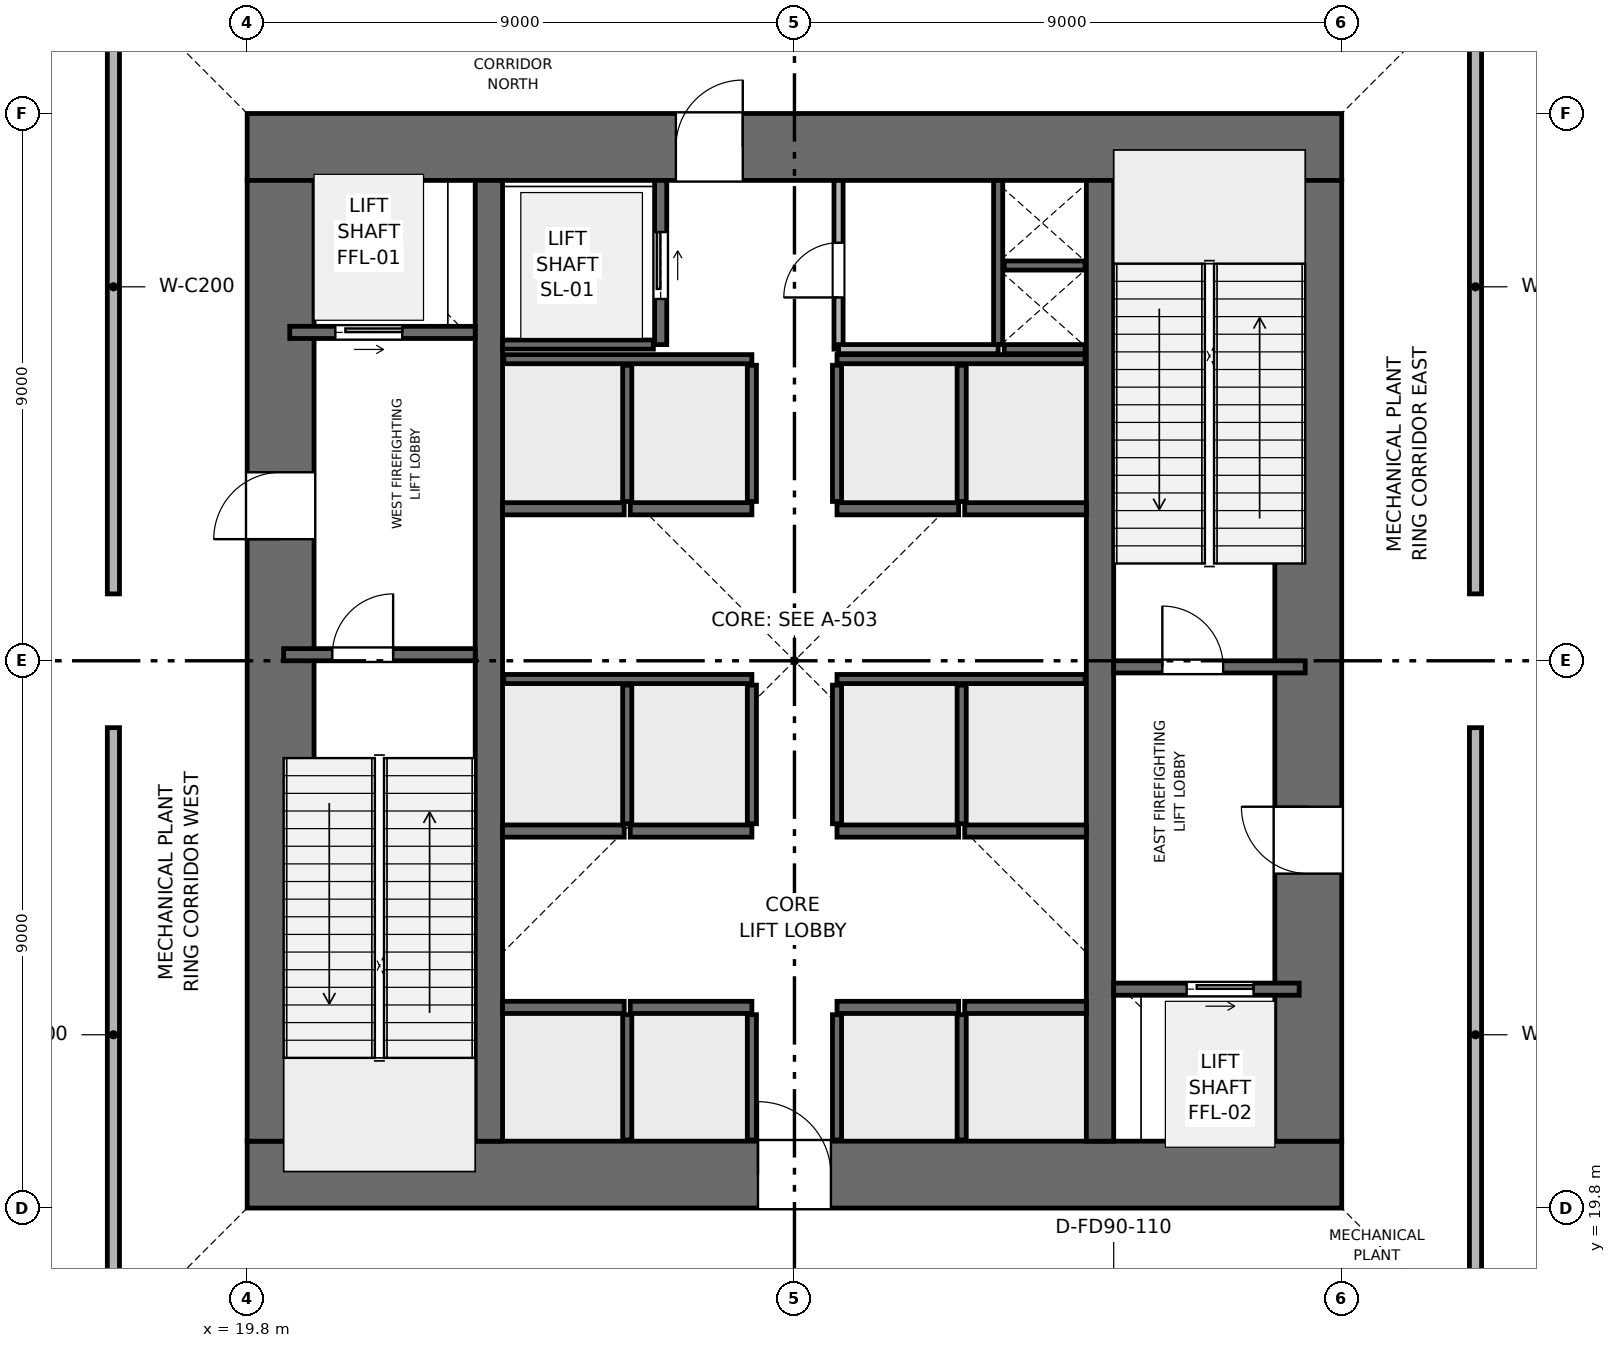
"""IFC4 building model, lengths in metres.
Left out: names, types, materials, properties, quantities, classifications, styles, units other than length and angle.
Written with IfcOpenShell. Run it as: python <this file> out.ifc"""

import sys

from ifc_helpers import new_model, si_unit, direction, frame, frame_2d, origin, place, context, subcontext, project, spatial, rectangle, extrude, element, fill, save


model = new_model("IFC4")
c1 = context("Model", 3, precision=1e-05, world=origin(), true_north=direction((0.0, 1.0)))
c2 = subcontext(c1, "Body", "Model", "MODEL_VIEW")
j1 = project(units=[si_unit("LENGTHUNIT", "METRE"), si_unit("PLANEANGLEUNIT", "RADIAN")], contexts=[c1])
p1 = place(None, origin())
s1 = spatial("IfcSite", under=j1, at=p1, CompositionType="ELEMENT")
p2 = place(p1, origin())
s2 = spatial("IfcBuilding", under=s1, at=p2, CompositionType="ELEMENT")
p3 = place(p2, frame((0.0, 0.0, 24.0)))
s3 = spatial("IfcBuildingStorey", under=s2, at=p3, CompositionType="ELEMENT", Elevation=24.0)
p4 = place(p3, frame((19.8, 20.35, 0.0), z_axis=(0.0, 0.0, 1.0), x_axis=(1.0, 0.0, 0.0)))
e1 = element("IfcWall", 1, at=p4, inside=s3, PredefinedType="SHEAR", context=c2, shape_type="SweptSolid", body=[
    extrude(rectangle(XDim=18.0, YDim=1.1, at=frame_2d((9.0, 0.0))), origin(), (0.0, 0.0, 1.0), 6.0),
])
p5 = place(p4, frame((8.4, 0.0, 0.0)))
e2 = element("IfcOpeningElement", 2, at=p5, cuts=e1, PredefinedType="OPENING", context=c2, shape_type="SweptSolid", body=[
    extrude(rectangle(XDim=1.2, YDim=2.2, at=frame_2d((0.6, 1.1))), frame((0.0, 0.56, 0.0), z_axis=(0.0, -1.0, 0.0), x_axis=(1.0, 0.0, 0.0)), (0.0, 0.0, 1.0), 1.12),
])
p6 = place(p3, frame((19.8, 37.25, 0.0), z_axis=(0.0, 0.0, 1.0), x_axis=(1.0, 0.0, 0.0)))
e3 = element("IfcWall", 3, at=p6, inside=s3, PredefinedType="SHEAR", context=c2, shape_type="SweptSolid", body=[
    extrude(rectangle(XDim=18.0, YDim=1.1, at=frame_2d((9.0, 0.0))), origin(), (0.0, 0.0, 1.0), 6.0),
])
p7 = place(p6, frame((7.05, 0.0, 0.0)))
e4 = element("IfcOpeningElement", 4, at=p7, cuts=e3, PredefinedType="OPENING", context=c2, shape_type="SweptSolid", body=[
    extrude(rectangle(XDim=1.1, YDim=2.15, at=frame_2d((0.55, 1.075))), frame((0.0, 0.56, 0.0), z_axis=(0.0, -1.0, 0.0), x_axis=(1.0, 0.0, 0.0)), (0.0, 0.0, 1.0), 1.12),
])
p8 = place(p3, frame((20.35, 20.9, 0.0), z_axis=(0.0, 0.0, 1.0), x_axis=(0.0, 1.0, 0.0)))
e5 = element("IfcWall", 5, at=p8, inside=s3, PredefinedType="SHEAR", context=c2, shape_type="SweptSolid", body=[
    extrude(rectangle(XDim=15.8, YDim=1.1, at=frame_2d((7.9, 0.0))), origin(), (0.0, 0.0, 1.0), 6.0),
])
p9 = place(p8, frame((9.9, 0.0, 0.0)))
e6 = element("IfcOpeningElement", 6, at=p9, cuts=e5, PredefinedType="OPENING", context=c2, shape_type="SweptSolid", body=[
    extrude(rectangle(XDim=1.1, YDim=2.15, at=frame_2d((0.55, 1.075))), frame((0.0, 0.56, 0.0), z_axis=(0.0, -1.0, 0.0), x_axis=(1.0, 0.0, 0.0)), (0.0, 0.0, 1.0), 1.12),
])
p10 = place(p3, frame((37.25, 20.9, 0.0), z_axis=(0.0, 0.0, 1.0), x_axis=(0.0, 1.0, 0.0)))
e7 = element("IfcWall", 7, at=p10, inside=s3, PredefinedType="SHEAR", context=c2, shape_type="SweptSolid", body=[
    extrude(rectangle(XDim=15.8, YDim=1.1, at=frame_2d((7.9, 0.0))), origin(), (0.0, 0.0, 1.0), 6.0),
])
p11 = place(p10, frame((4.4, 0.0, 0.0)))
e8 = element("IfcOpeningElement", 8, at=p11, cuts=e7, PredefinedType="OPENING", context=c2, shape_type="SweptSolid", body=[
    extrude(rectangle(XDim=1.1, YDim=2.15, at=frame_2d((0.55, 1.075))), frame((0.0, 0.56, 0.0), z_axis=(0.0, -1.0, 0.0), x_axis=(1.0, 0.0, 0.0)), (0.0, 0.0, 1.0), 1.12),
])
for number, where, z_axis, x_axis in (
    (9, (23.775, 20.9, 0.0), (0.0, 0.0, 1.0), (0.0, 1.0, 0.0)),
    (10, (33.825, 20.9, 0.0), (0.0, 0.0, 1.0), (0.0, 1.0, 0.0)),
):
    element("IfcWall", number, at=place(p3, frame(where, z_axis=z_axis, x_axis=x_axis)), inside=s3, PredefinedType="SHEAR", context=c2, shape_type="SweptSolid", body=[
        extrude(rectangle(XDim=15.8, YDim=0.45, at=frame_2d((7.9, 0.0))), origin(), (0.0, 0.0, 1.0), 6.0),
    ])
p12 = place(p3, frame((20.4, 28.9, 0.0), z_axis=(0.0, 0.0, 1.0), x_axis=(1.0, 0.0, 0.0)))
e11 = element("IfcWall", 11, at=p12, inside=s3, PredefinedType="SHEAR", context=c2, shape_type="SweptSolid", body=[
    extrude(rectangle(XDim=3.15, YDim=0.2, at=frame_2d((1.575, 0.0))), origin(), (0.0, 0.0, 1.0), 5.75),
])
p13 = place(p12, frame((0.8, 0.0, 0.0)))
e12 = element("IfcOpeningElement", 12, at=p13, cuts=e11, PredefinedType="OPENING", context=c2, shape_type="SweptSolid", body=[
    extrude(rectangle(XDim=1.0, YDim=2.1, at=frame_2d((0.5, 1.05))), frame((0.0, 0.11, 0.0), z_axis=(0.0, -1.0, 0.0), x_axis=(1.0, 0.0, 0.0)), (0.0, 0.0, 1.0), 0.22),
])
p14 = place(p3, frame((34.05, 28.7, 0.0), z_axis=(0.0, 0.0, 1.0), x_axis=(1.0, 0.0, 0.0)))
e13 = element("IfcWall", 13, at=p14, inside=s3, PredefinedType="SHEAR", context=c2, shape_type="SweptSolid", body=[
    extrude(rectangle(XDim=3.15, YDim=0.2, at=frame_2d((1.575, 0.0))), origin(), (0.0, 0.0, 1.0), 5.75),
])
p15 = place(p14, frame((0.8, 0.0, 0.0)))
e14 = element("IfcOpeningElement", 14, at=p15, cuts=e13, PredefinedType="OPENING", context=c2, shape_type="SweptSolid", body=[
    extrude(rectangle(XDim=1.0, YDim=2.1, at=frame_2d((0.5, 1.05))), frame((0.0, 0.11, 0.0), z_axis=(0.0, -1.0, 0.0), x_axis=(1.0, 0.0, 0.0)), (0.0, 0.0, 1.0), 0.22),
])
p16 = place(p3, frame((32.15, 34.0, 0.0), z_axis=(0.0, 0.0, 1.0), x_axis=(0.0, 1.0, 0.0)))
e15 = element("IfcWall", 15, at=p16, inside=s3, PredefinedType="SHEAR", context=c2, shape_type="SweptSolid", body=[
    extrude(rectangle(XDim=2.7, YDim=0.15, at=frame_2d((1.35, 0.0))), origin(), (0.0, 0.0, 1.0), 5.75),
])
for number, where, z_axis, x_axis in (
    (16, (32.25, 33.925, 0.0), (0.0, 0.0, 1.0), (1.0, 0.0, 0.0)),
    (17, (32.25, 35.3, 0.0), (0.0, 0.0, 1.0), (1.0, 0.0, 0.0)),
):
    element("IfcWall", number, at=place(p3, frame(where, z_axis=z_axis, x_axis=x_axis)), inside=s3, PredefinedType="SHEAR", context=c2, shape_type="SweptSolid", body=[
        extrude(rectangle(XDim=1.33, YDim=0.15, at=frame_2d((0.665, 0.0))), origin(), (0.0, 0.0, 1.0), 5.75),
    ])
p17 = place(p3, frame((20.5, 34.2, 0.0), z_axis=(0.0, 0.0, 1.0), x_axis=(1.0, 0.0, 0.0)))
e18 = element("IfcWall", 18, at=p17, inside=s3, PredefinedType="SHEAR", context=c2, shape_type="SweptSolid", body=[
    extrude(rectangle(XDim=3.05, YDim=0.2, at=frame_2d((1.525, 0.0))), origin(), (0.0, 0.0, 1.0), 5.75),
])
p18 = place(p17, frame((0.75, 0.0, 0.0)))
e19 = element("IfcOpeningElement", 19, at=p18, cuts=e18, PredefinedType="OPENING", context=c2, shape_type="SweptSolid", body=[
    extrude(rectangle(XDim=1.1, YDim=2.15, at=frame_2d((0.55, 1.075))), frame((0.0, 0.11, 0.0), z_axis=(0.0, -1.0, 0.0), x_axis=(1.0, 0.0, 0.0)), (0.0, 0.0, 1.0), 0.22),
])
p19 = place(p3, frame((34.05, 23.4, 0.0), z_axis=(0.0, 0.0, 1.0), x_axis=(1.0, 0.0, 0.0)))
e20 = element("IfcWall", 20, at=p19, inside=s3, PredefinedType="SHEAR", context=c2, shape_type="SweptSolid", body=[
    extrude(rectangle(XDim=3.05, YDim=0.2, at=frame_2d((1.525, 0.0))), origin(), (0.0, 0.0, 1.0), 5.75),
])
p20 = place(p19, frame((1.2, 0.0, 0.0)))
e21 = element("IfcOpeningElement", 21, at=p20, cuts=e20, PredefinedType="OPENING", context=c2, shape_type="SweptSolid", body=[
    extrude(rectangle(XDim=1.1, YDim=2.15, at=frame_2d((0.55, 1.075))), frame((0.0, 0.11, 0.0), z_axis=(0.0, -1.0, 0.0), x_axis=(1.0, 0.0, 0.0)), (0.0, 0.0, 1.0), 0.22),
])
p21 = place(p3, frame((26.6, 34.0, 0.0), z_axis=(0.0, 0.0, 1.0), x_axis=(0.0, 1.0, 0.0)))
e22 = element("IfcWall", 22, at=p21, inside=s3, PredefinedType="SHEAR", context=c2, shape_type="SweptSolid", body=[
    extrude(rectangle(XDim=2.7, YDim=0.2, at=frame_2d((1.35, 0.0))), origin(), (0.0, 0.0, 1.0), 5.75),
])
p22 = place(p21, frame((0.75, 0.0, 0.0)))
e23 = element("IfcOpeningElement", 23, at=p22, cuts=e22, PredefinedType="OPENING", context=c2, shape_type="SweptSolid", body=[
    extrude(rectangle(XDim=1.1, YDim=2.15, at=frame_2d((0.55, 1.075))), frame((0.0, 0.11, 0.0), z_axis=(0.0, -1.0, 0.0), x_axis=(1.0, 0.0, 0.0)), (0.0, 0.0, 1.0), 0.22),
])
p23 = place(p3, frame((24.0, 34.0, 0.0), z_axis=(0.0, 0.0, 1.0), x_axis=(1.0, 0.0, 0.0)))
e24 = element("IfcWall", 24, at=p23, inside=s3, PredefinedType="SHEAR", context=c2, shape_type="SweptSolid", body=[
    extrude(rectangle(XDim=2.48, YDim=0.15, at=frame_2d((1.24, 0.0))), origin(), (0.0, 0.0, 1.0), 5.75),
])
for number, where, z_axis, x_axis in (
    (25, (24.0, 23.1, 0.0), (0.0, 0.0, 1.0), (1.0, 0.0, 0.0)),
    (26, (26.1, 23.1, 0.0), (0.0, 0.0, 1.0), (1.0, 0.0, 0.0)),
    (27, (29.5, 23.1, 0.0), (0.0, 0.0, 1.0), (1.0, 0.0, 0.0)),
    (28, (31.6, 23.1, 0.0), (0.0, 0.0, 1.0), (1.0, 0.0, 0.0)),
    (29, (24.0, 26.0, 0.0), (0.0, 0.0, 1.0), (1.0, 0.0, 0.0)),
    (30, (26.1, 26.0, 0.0), (0.0, 0.0, 1.0), (1.0, 0.0, 0.0)),
    (31, (29.5, 26.0, 0.0), (0.0, 0.0, 1.0), (1.0, 0.0, 0.0)),
    (32, (31.6, 26.0, 0.0), (0.0, 0.0, 1.0), (1.0, 0.0, 0.0)),
    (33, (24.0, 31.3, 0.0), (0.0, 0.0, 1.0), (1.0, 0.0, 0.0)),
    (34, (26.1, 31.3, 0.0), (0.0, 0.0, 1.0), (1.0, 0.0, 0.0)),
    (35, (29.5, 31.3, 0.0), (0.0, 0.0, 1.0), (1.0, 0.0, 0.0)),
    (36, (31.6, 31.3, 0.0), (0.0, 0.0, 1.0), (1.0, 0.0, 0.0)),
):
    element("IfcWall", number, at=place(p3, frame(where, z_axis=z_axis, x_axis=x_axis)), inside=s3, PredefinedType="SHEAR", context=c2, shape_type="SweptSolid", body=[
        extrude(rectangle(XDim=2.0, YDim=0.2, at=frame_2d((1.0, 0.0))), origin(), (0.0, 0.0, 1.0), 5.75),
    ])
for number, where, z_axis, x_axis in (
    (37, (26.05, 20.92, 0.0), (0.0, 0.0, 1.0), (0.0, 1.0, 0.0)),
    (38, (28.1, 20.92, 0.0), (0.0, 0.0, 1.0), (0.0, 1.0, 0.0)),
    (39, (29.5, 20.92, 0.0), (0.0, 0.0, 1.0), (0.0, 1.0, 0.0)),
    (40, (31.55, 20.92, 0.0), (0.0, 0.0, 1.0), (0.0, 1.0, 0.0)),
):
    element("IfcWall", number, at=place(p3, frame(where, z_axis=z_axis, x_axis=x_axis)), inside=s3, PredefinedType="SHEAR", context=c2, shape_type="SweptSolid", body=[
        extrude(rectangle(XDim=2.06, YDim=0.15, at=frame_2d((1.03, 0.0))), origin(), (0.0, 0.0, 1.0), 5.75),
    ])
for number, where, z_axis, x_axis in (
    (41, (24.02, 28.5, 0.0), (0.0, 0.0, 1.0), (1.0, 0.0, 0.0)),
    (42, (29.5, 28.5, 0.0), (0.0, 0.0, 1.0), (1.0, 0.0, 0.0)),
):
    element("IfcWall", number, at=place(p3, frame(where, z_axis=z_axis, x_axis=x_axis)), inside=s3, PredefinedType="SHEAR", context=c2, shape_type="SweptSolid", body=[
        extrude(rectangle(XDim=4.08, YDim=0.15, at=frame_2d((2.04, 0.0))), origin(), (0.0, 0.0, 1.0), 5.75),
    ])
for number, where, z_axis, x_axis in (
    (43, (26.05, 26.12, 0.0), (0.0, 0.0, 1.0), (0.0, 1.0, 0.0)),
    (44, (28.1, 26.12, 0.0), (0.0, 0.0, 1.0), (0.0, 1.0, 0.0)),
    (45, (29.5, 26.12, 0.0), (0.0, 0.0, 1.0), (0.0, 1.0, 0.0)),
    (46, (31.55, 26.12, 0.0), (0.0, 0.0, 1.0), (0.0, 1.0, 0.0)),
):
    element("IfcWall", number, at=place(p3, frame(where, z_axis=z_axis, x_axis=x_axis)), inside=s3, PredefinedType="SHEAR", context=c2, shape_type="SweptSolid", body=[
        extrude(rectangle(XDim=2.28, YDim=0.15, at=frame_2d((1.14, 0.0))), origin(), (0.0, 0.0, 1.0), 5.75),
    ])
for number, where, z_axis, x_axis in (
    (47, (24.02, 33.76, 0.0), (0.0, 0.0, 1.0), (1.0, 0.0, 0.0)),
    (48, (29.5, 33.76, 0.0), (0.0, 0.0, 1.0), (1.0, 0.0, 0.0)),
):
    element("IfcWall", number, at=place(p3, frame(where, z_axis=z_axis, x_axis=x_axis)), inside=s3, PredefinedType="SHEAR", context=c2, shape_type="SweptSolid", body=[
        extrude(rectangle(XDim=4.08, YDim=0.15, at=frame_2d((2.04, 0.0))), origin(), (0.0, 0.0, 1.0), 5.75),
    ])
for number, where, z_axis, x_axis in (
    (49, (26.05, 31.42, 0.0), (0.0, 0.0, 1.0), (0.0, 1.0, 0.0)),
    (50, (28.1, 31.42, 0.0), (0.0, 0.0, 1.0), (0.0, 1.0, 0.0)),
    (51, (29.5, 31.42, 0.0), (0.0, 0.0, 1.0), (0.0, 1.0, 0.0)),
    (52, (31.55, 31.42, 0.0), (0.0, 0.0, 1.0), (0.0, 1.0, 0.0)),
):
    element("IfcWall", number, at=place(p3, frame(where, z_axis=z_axis, x_axis=x_axis)), inside=s3, PredefinedType="SHEAR", context=c2, shape_type="SweptSolid", body=[
        extrude(rectangle(XDim=2.24, YDim=0.15, at=frame_2d((1.12, 0.0))), origin(), (0.0, 0.0, 1.0), 5.75),
    ])
p24 = place(p3, frame((29.525, 33.925, 0.0), z_axis=(0.0, 0.0, 1.0), x_axis=(0.0, 1.0, 0.0)))
e53 = element("IfcWall", 53, at=p24, inside=s3, PredefinedType="PARTITIONING", context=c2, shape_type="SweptSolid", body=[
    extrude(rectangle(XDim=2.775, YDim=0.15, at=frame_2d((1.387, 0.0))), origin(), (0.0, 0.0, 1.0), 5.75),
])
p25 = place(p24, frame((0.85, 0.0, 0.0)))
e54 = element("IfcOpeningElement", 54, at=p25, cuts=e53, PredefinedType="OPENING", context=c2, shape_type="SweptSolid", body=[
    extrude(rectangle(XDim=0.9, YDim=2.1, at=frame_2d((0.45, 1.05))), frame((0.0, 0.085, 0.0), z_axis=(0.0, -1.0, 0.0), x_axis=(1.0, 0.0, 0.0)), (0.0, 0.0, 1.0), 0.17),
])
p26 = place(p3, frame((29.525, 33.925, 0.0), z_axis=(0.0, 0.0, 1.0), x_axis=(1.0, 0.0, 0.0)))
e55 = element("IfcWall", 55, at=p26, inside=s3, PredefinedType="PARTITIONING", context=c2, shape_type="SweptSolid", body=[
    extrude(rectangle(XDim=2.625, YDim=0.15, at=frame_2d((1.312, 0.0))), origin(), (0.0, 0.0, 1.0), 5.75),
])
p27 = place(p3, frame((17.6, 17.6, 0.0), z_axis=(0.0, 0.0, 1.0), x_axis=(0.0, 1.0, 0.0)))
e56 = element("IfcWall", 56, at=p27, inside=s3, PredefinedType="PARTITIONING", context=c2, shape_type="SweptSolid", body=[
    extrude(rectangle(XDim=10.1, YDim=0.2, at=frame_2d((5.05, 0.0))), origin(), (0.0, 0.0, 1.0), 5.185),
])
p28 = place(p3, frame((17.6, 29.9, 0.0), z_axis=(0.0, 0.0, 1.0), x_axis=(0.0, 1.0, 0.0)))
e57 = element("IfcWall", 57, at=p28, inside=s3, PredefinedType="PARTITIONING", context=c2, shape_type="SweptSolid", body=[
    extrude(rectangle(XDim=10.1, YDim=0.2, at=frame_2d((5.05, 0.0))), origin(), (0.0, 0.0, 1.0), 5.185),
])
p29 = place(p3, frame((40.0, 17.6, 0.0), z_axis=(0.0, 0.0, 1.0), x_axis=(0.0, 1.0, 0.0)))
e58 = element("IfcWall", 58, at=p29, inside=s3, PredefinedType="PARTITIONING", context=c2, shape_type="SweptSolid", body=[
    extrude(rectangle(XDim=10.1, YDim=0.2, at=frame_2d((5.05, 0.0))), origin(), (0.0, 0.0, 1.0), 5.185),
])
p30 = place(p3, frame((40.0, 29.9, 0.0), z_axis=(0.0, 0.0, 1.0), x_axis=(0.0, 1.0, 0.0)))
e59 = element("IfcWall", 59, at=p30, inside=s3, PredefinedType="PARTITIONING", context=c2, shape_type="SweptSolid", body=[
    extrude(rectangle(XDim=10.1, YDim=0.2, at=frame_2d((5.05, 0.0))), origin(), (0.0, 0.0, 1.0), 5.185),
])
p31 = place(p13, origin())
e60 = element("IfcDoor", 60, at=p31, inside=s3, OperationType="SINGLE_SWING_RIGHT", PredefinedType="DOOR", context=c2, shape_type="SweptSolid", body=[
    extrude(rectangle(XDim=1.0, YDim=2.1, at=frame_2d((0.5, 1.05))), frame((0.0, 0.025, 0.0), z_axis=(0.0, -1.0, 0.0), x_axis=(1.0, 0.0, 0.0)), (0.0, 0.0, 1.0), 0.05),
])
fill(e12, e60)
p32 = place(p15, origin())
e61 = element("IfcDoor", 61, at=p32, inside=s3, OperationType="SINGLE_SWING_LEFT", PredefinedType="DOOR", context=c2, shape_type="SweptSolid", body=[
    extrude(rectangle(XDim=1.0, YDim=2.1, at=frame_2d((0.5, 1.05))), frame((0.0, 0.025, 0.0), z_axis=(0.0, -1.0, 0.0), x_axis=(1.0, 0.0, 0.0)), (0.0, 0.0, 1.0), 0.05),
])
fill(e14, e61)
p33 = place(p18, origin())
e62 = element("IfcDoor", 62, at=p33, inside=s3, OperationType="SLIDING_TO_RIGHT", PredefinedType="DOOR", context=c2, shape_type="SweptSolid", body=[
    extrude(rectangle(XDim=1.1, YDim=2.15, at=frame_2d((0.55, 1.075))), frame((0.0, 0.025, 0.0), z_axis=(0.0, -1.0, 0.0), x_axis=(1.0, 0.0, 0.0)), (0.0, 0.0, 1.0), 0.05),
])
fill(e19, e62)
p34 = place(p20, origin())
e63 = element("IfcDoor", 63, at=p34, inside=s3, OperationType="SLIDING_TO_RIGHT", PredefinedType="DOOR", context=c2, shape_type="SweptSolid", body=[
    extrude(rectangle(XDim=1.1, YDim=2.15, at=frame_2d((0.55, 1.075))), frame((0.0, 0.025, 0.0), z_axis=(0.0, -1.0, 0.0), x_axis=(1.0, 0.0, 0.0)), (0.0, 0.0, 1.0), 0.05),
])
fill(e21, e63)
p35 = place(p22, origin())
e64 = element("IfcDoor", 64, at=p35, inside=s3, OperationType="SLIDING_TO_RIGHT", PredefinedType="DOOR", context=c2, shape_type="SweptSolid", body=[
    extrude(rectangle(XDim=1.1, YDim=2.15, at=frame_2d((0.55, 1.075))), frame((0.0, 0.025, 0.0), z_axis=(0.0, -1.0, 0.0), x_axis=(1.0, 0.0, 0.0)), (0.0, 0.0, 1.0), 0.05),
])
fill(e23, e64)
p36 = place(p25, origin())
e65 = element("IfcDoor", 65, at=p36, inside=s3, OperationType="SINGLE_SWING_LEFT", PredefinedType="DOOR", context=c2, shape_type="SweptSolid", body=[
    extrude(rectangle(XDim=0.9, YDim=2.1, at=frame_2d((0.45, 1.05))), frame((0.0, 0.025, 0.0), z_axis=(0.0, -1.0, 0.0), x_axis=(1.0, 0.0, 0.0)), (0.0, 0.0, 1.0), 0.05),
])
fill(e54, e65)
p37 = place(p9, origin())
e66 = element("IfcDoor", 66, at=p37, inside=s3, OperationType="SINGLE_SWING_LEFT", PredefinedType="DOOR", context=c2, shape_type="SweptSolid", body=[
    extrude(rectangle(XDim=1.1, YDim=2.15, at=frame_2d((0.55, 1.075))), frame((0.0, 0.025, 0.0), z_axis=(0.0, -1.0, 0.0), x_axis=(1.0, 0.0, 0.0)), (0.0, 0.0, 1.0), 0.05),
])
fill(e6, e66)
p38 = place(p11, origin())
e67 = element("IfcDoor", 67, at=p38, inside=s3, OperationType="SINGLE_SWING_RIGHT", PredefinedType="DOOR", context=c2, shape_type="SweptSolid", body=[
    extrude(rectangle(XDim=1.1, YDim=2.15, at=frame_2d((0.55, 1.075))), frame((0.0, 0.025, 0.0), z_axis=(0.0, -1.0, 0.0), x_axis=(1.0, 0.0, 0.0)), (0.0, 0.0, 1.0), 0.05),
])
fill(e8, e67)
p39 = place(p5, origin())
e68 = element("IfcDoor", 68, at=p39, inside=s3, OperationType="SINGLE_SWING_LEFT", PredefinedType="DOOR", context=c2, shape_type="SweptSolid", body=[
    extrude(rectangle(XDim=1.2, YDim=2.2, at=frame_2d((0.6, 1.1))), frame((0.0, 0.025, 0.0), z_axis=(0.0, -1.0, 0.0), x_axis=(1.0, 0.0, 0.0)), (0.0, 0.0, 1.0), 0.05),
])
fill(e2, e68)
p40 = place(p7, origin())
e69 = element("IfcDoor", 69, at=p40, inside=s3, OperationType="SINGLE_SWING_RIGHT", PredefinedType="DOOR", context=c2, shape_type="SweptSolid", body=[
    extrude(rectangle(XDim=1.1, YDim=2.15, at=frame_2d((0.55, 1.075))), frame((0.0, 0.025, 0.0), z_axis=(0.0, -1.0, 0.0), x_axis=(1.0, 0.0, 0.0)), (0.0, 0.0, 1.0), 0.05),
])
fill(e4, e69)
save(model, sys.argv[1])
